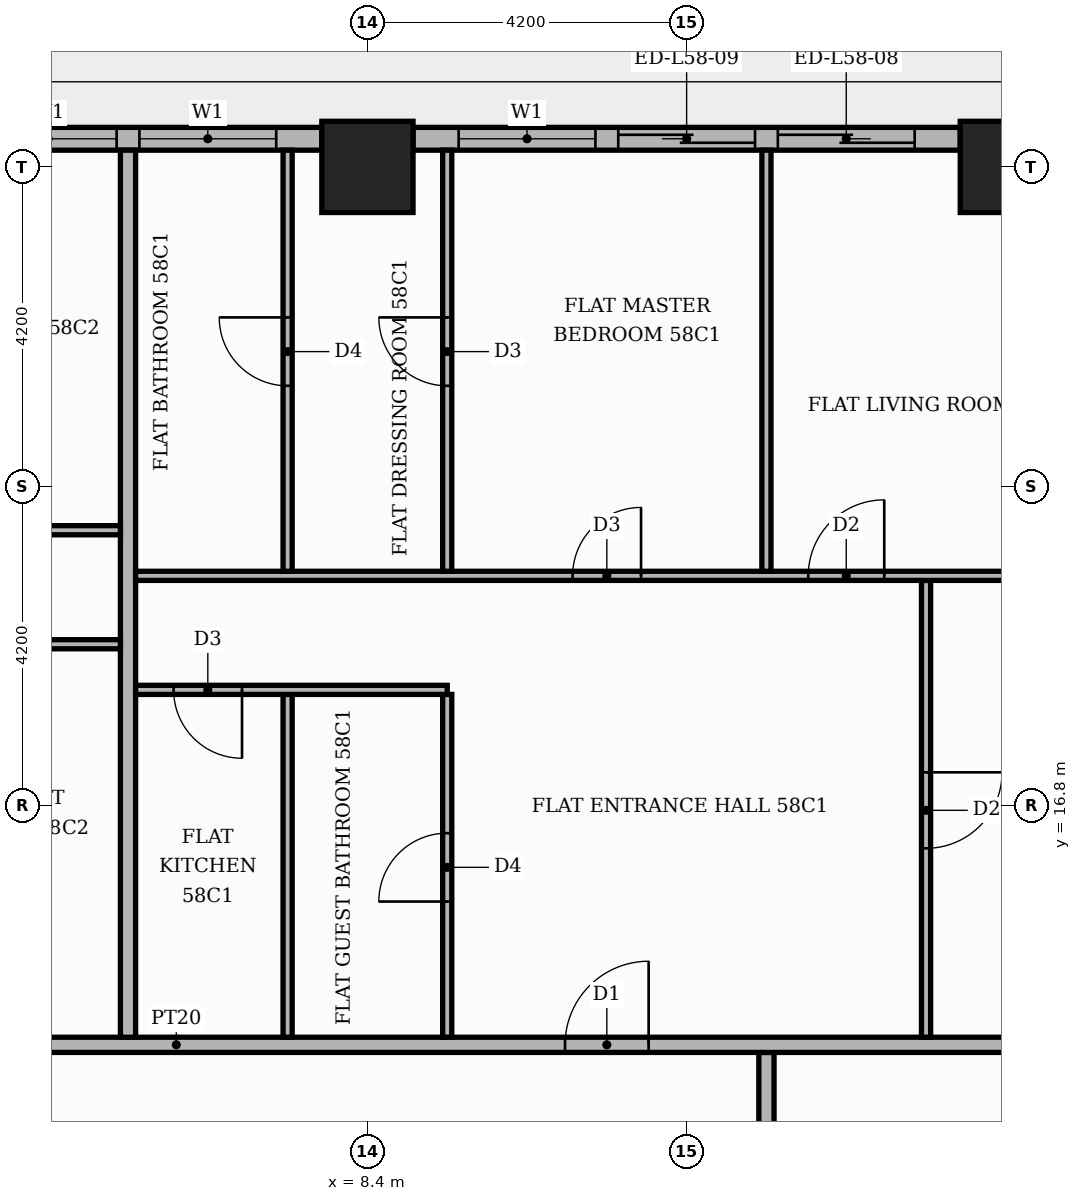
"""IFC4 building model, lengths in metres.
Left out: names, types, materials, properties, quantities, classifications, styles, units other than length and angle.
Written with IfcOpenShell. Run it as: python <this file> out.ifc"""

import sys

from ifc_helpers import new_model, si_unit, direction, frame, frame_2d, origin, origin_2d, place, context, subcontext, project, spatial, rectangle, extrude, element, fill, save


model = new_model("IFC4")
c1 = context("Model", 3, precision=1e-05, world=origin(), true_north=direction((0.0, 1.0)))
c2 = subcontext(c1, "Body", "Model", "MODEL_VIEW")
j1 = project(units=[si_unit("LENGTHUNIT", "METRE"), si_unit("PLANEANGLEUNIT", "RADIAN")], contexts=[c1])
p1 = place(None, origin())
s1 = spatial("IfcSite", under=j1, at=p1, CompositionType="ELEMENT")
p2 = place(p1, origin())
s2 = spatial("IfcBuilding", under=s1, at=p2, CompositionType="ELEMENT")
p3 = place(p2, frame((0.0, 0.0, 244.5)))
s3 = spatial("IfcBuildingStorey", under=s2, at=p3, CompositionType="ELEMENT", Elevation=244.5)
for number, where, z_axis, x_axis in (
    (1, (8.4, 25.2, 0.0), (0.0, 0.0, 1.0), (1.0, 0.0, 0.0)),
    (2, (16.8, 25.2, 0.0), (0.0, 0.0, 1.0), (1.0, 0.0, 0.0)),
):
    element("IfcColumn", number, at=place(p3, frame(where, z_axis=z_axis, x_axis=x_axis)), inside=s3, PredefinedType="COLUMN", context=c2, shape_type="SweptSolid", body=[
        extrude(rectangle(XDim=1.2, YDim=1.2, at=origin_2d()), origin(), (0.0, 0.0, 1.0), 3.9),
    ])
p4 = place(p3, frame((16.2, 25.57, 0.0), z_axis=(0.0, 0.0, 1.0), x_axis=(-1.0, 0.0, 0.0)))
e3 = element("IfcWall", 3, at=p4, inside=s3, PredefinedType="STANDARD", context=c2, shape_type="SweptSolid", body=[
    extrude(rectangle(XDim=7.2, YDim=0.3, at=frame_2d((3.6, 0.0))), origin(), (0.0, 0.0, 1.0), 3.48),
])
p5 = place(p4, frame((0.6, 0.0, 0.0)))
e4 = element("IfcOpeningElement", 4, at=p5, cuts=e3, PredefinedType="OPENING", context=c2, shape_type="SweptSolid", body=[
    extrude(rectangle(XDim=1.8, YDim=2.4, at=frame_2d((0.9, 1.2))), frame((0.0, 0.16, 0.0), z_axis=(0.0, -1.0, 0.0), x_axis=(1.0, 0.0, 0.0)), (0.0, 0.0, 1.0), 0.32),
])
p6 = place(p4, frame((2.7, 0.0, 0.0)))
e5 = element("IfcOpeningElement", 5, at=p6, cuts=e3, PredefinedType="OPENING", context=c2, shape_type="SweptSolid", body=[
    extrude(rectangle(XDim=1.8, YDim=2.4, at=frame_2d((0.9, 1.2))), frame((0.0, 0.16, 0.0), z_axis=(0.0, -1.0, 0.0), x_axis=(1.0, 0.0, 0.0)), (0.0, 0.0, 1.0), 0.32),
])
p7 = place(p4, frame((4.8, 0.0, 0.9)))
e6 = element("IfcOpeningElement", 6, at=p7, cuts=e3, PredefinedType="OPENING", context=c2, shape_type="SweptSolid", body=[
    extrude(rectangle(XDim=1.8, YDim=2.1, at=frame_2d((0.9, 1.05))), frame((0.0, 0.16, 0.0), z_axis=(0.0, -1.0, 0.0), x_axis=(1.0, 0.0, 0.0)), (0.0, 0.0, 1.0), 0.32),
])
p8 = place(p3, frame((7.8, 25.57, 0.0), z_axis=(0.0, 0.0, 1.0), x_axis=(-1.0, 0.0, 0.0)))
e7 = element("IfcWall", 7, at=p8, inside=s3, PredefinedType="STANDARD", context=c2, shape_type="SweptSolid", body=[
    extrude(rectangle(XDim=7.2, YDim=0.3, at=frame_2d((3.6, 0.0))), origin(), (0.0, 0.0, 1.0), 3.48),
])
p9 = place(p8, frame((0.6, 0.0, 0.9)))
e8 = element("IfcOpeningElement", 8, at=p9, cuts=e7, PredefinedType="OPENING", context=c2, shape_type="SweptSolid", body=[
    extrude(rectangle(XDim=1.8, YDim=2.1, at=frame_2d((0.9, 1.05))), frame((0.0, 0.16, 0.0), z_axis=(0.0, -1.0, 0.0), x_axis=(1.0, 0.0, 0.0)), (0.0, 0.0, 1.0), 0.32),
])
p10 = place(p8, frame((2.7, 0.0, 0.9)))
e9 = element("IfcOpeningElement", 9, at=p10, cuts=e7, PredefinedType="OPENING", context=c2, shape_type="SweptSolid", body=[
    extrude(rectangle(XDim=1.8, YDim=2.1, at=frame_2d((0.9, 1.05))), frame((0.0, 0.16, 0.0), z_axis=(0.0, -1.0, 0.0), x_axis=(1.0, 0.0, 0.0)), (0.0, 0.0, 1.0), 0.32),
])
p11 = place(p8, frame((4.8, 0.0, 0.0)))
e10 = element("IfcOpeningElement", 10, at=p11, cuts=e7, PredefinedType="OPENING", context=c2, shape_type="SweptSolid", body=[
    extrude(rectangle(XDim=1.8, YDim=2.4, at=frame_2d((0.9, 1.2))), frame((0.0, 0.16, 0.0), z_axis=(0.0, -1.0, 0.0), x_axis=(1.0, 0.0, 0.0)), (0.0, 0.0, 1.0), 0.32),
])
p12 = place(p3, frame((13.65, 11.1, 0.0), z_axis=(0.0, 0.0, 1.0), x_axis=(0.0, 1.0, 0.0)))
e11 = element("IfcWall", 11, at=p12, inside=s3, PredefinedType="PARTITIONING", context=c2, shape_type="SweptSolid", body=[
    extrude(rectangle(XDim=2.45, YDim=0.2, at=frame_2d((1.225, 0.0))), origin(), (0.0, 0.0, 1.0), 3.48),
])
p13 = place(p3, frame((-13.65, 13.65, 0.0), z_axis=(0.0, 0.0, 1.0), x_axis=(1.0, 0.0, 0.0)))
e12 = element("IfcWall", 12, at=p13, inside=s3, PredefinedType="PARTITIONING", context=c2, shape_type="SweptSolid", body=[
    extrude(rectangle(XDim=39.07, YDim=0.2, at=frame_2d((19.535, 0.0))), origin(), (0.0, 0.0, 1.0), 3.48),
])
p14 = place(p13, frame((24.65, 0.0, 0.0)))
e13 = element("IfcOpeningElement", 13, at=p14, cuts=e12, PredefinedType="OPENING", context=c2, shape_type="SweptSolid", body=[
    extrude(rectangle(XDim=1.1, YDim=2.4, at=frame_2d((0.55, 1.2))), frame((0.0, 0.11, 0.0), z_axis=(0.0, -1.0, 0.0), x_axis=(1.0, 0.0, 0.0)), (0.0, 0.0, 1.0), 0.22),
])
p15 = place(p13, frame((12.05, 0.0, 0.0)))
e14 = element("IfcOpeningElement", 14, at=p15, cuts=e12, PredefinedType="OPENING", context=c2, shape_type="SweptSolid", body=[
    extrude(rectangle(XDim=1.1, YDim=2.4, at=frame_2d((0.55, 1.2))), frame((0.0, 0.11, 0.0), z_axis=(0.0, -1.0, 0.0), x_axis=(1.0, 0.0, 0.0)), (0.0, 0.0, 1.0), 0.22),
])
p16 = place(p3, frame((5.25, 13.75, 0.0), z_axis=(0.0, 0.0, 1.0), x_axis=(0.0, 1.0, 0.0)))
e15 = element("IfcWall", 15, at=p16, inside=s3, PredefinedType="PARTITIONING", context=c2, shape_type="SweptSolid", body=[
    extrude(rectangle(XDim=11.67, YDim=0.2, at=frame_2d((5.835, 0.0))), origin(), (0.0, 0.0, 1.0), 3.48),
])
p17 = place(p3, frame((7.35, 13.75, 0.0), z_axis=(0.0, 0.0, 1.0), x_axis=(0.0, 1.0, 0.0)))
e16 = element("IfcWall", 16, at=p17, inside=s3, PredefinedType="PARTITIONING", context=c2, shape_type="SweptSolid", body=[
    extrude(rectangle(XDim=4.51, YDim=0.12, at=frame_2d((2.255, 0.0))), origin(), (0.0, 0.0, 1.0), 3.48),
])
p18 = place(p3, frame((9.45, 13.75, 0.0), z_axis=(0.0, 0.0, 1.0), x_axis=(0.0, 1.0, 0.0)))
e17 = element("IfcWall", 17, at=p18, inside=s3, PredefinedType="PARTITIONING", context=c2, shape_type="SweptSolid", body=[
    extrude(rectangle(XDim=4.51, YDim=0.12, at=frame_2d((2.255, 0.0))), origin(), (0.0, 0.0, 1.0), 3.48),
])
p19 = place(p18, frame((1.785, 0.0, 0.0)))
e18 = element("IfcOpeningElement", 18, at=p19, cuts=e17, PredefinedType="OPENING", context=c2, shape_type="SweptSolid", body=[
    extrude(rectangle(XDim=0.9, YDim=2.1, at=frame_2d((0.45, 1.05))), frame((0.0, 0.07, 0.0), z_axis=(0.0, -1.0, 0.0), x_axis=(1.0, 0.0, 0.0)), (0.0, 0.0, 1.0), 0.14),
])
p20 = place(p3, frame((15.75, 13.75, 0.0), z_axis=(0.0, 0.0, 1.0), x_axis=(0.0, 1.0, 0.0)))
e19 = element("IfcWall", 19, at=p20, inside=s3, PredefinedType="PARTITIONING", context=c2, shape_type="SweptSolid", body=[
    extrude(rectangle(XDim=6.01, YDim=0.12, at=frame_2d((3.005, 0.0))), origin(), (0.0, 0.0, 1.0), 3.48),
])
p21 = place(p20, frame((2.485, 0.0, 0.0)))
e20 = element("IfcOpeningElement", 20, at=p21, cuts=e19, PredefinedType="OPENING", context=c2, shape_type="SweptSolid", body=[
    extrude(rectangle(XDim=1.0, YDim=2.1, at=frame_2d((0.5, 1.05))), frame((0.0, 0.07, 0.0), z_axis=(0.0, -1.0, 0.0), x_axis=(1.0, 0.0, 0.0)), (0.0, 0.0, 1.0), 0.14),
])
p22 = place(p3, frame((5.35, 18.32, 0.0), z_axis=(0.0, 0.0, 1.0), x_axis=(1.0, 0.0, 0.0)))
e21 = element("IfcWall", 21, at=p22, inside=s3, PredefinedType="PARTITIONING", context=c2, shape_type="SweptSolid", body=[
    extrude(rectangle(XDim=4.1, YDim=0.12, at=frame_2d((2.05, 0.0))), origin(), (0.0, 0.0, 1.0), 3.48),
])
p23 = place(p22, frame((0.5, 0.0, 0.0)))
e22 = element("IfcOpeningElement", 22, at=p23, cuts=e21, PredefinedType="OPENING", context=c2, shape_type="SweptSolid", body=[
    extrude(rectangle(XDim=0.9, YDim=2.1, at=frame_2d((0.45, 1.05))), frame((0.0, 0.07, 0.0), z_axis=(0.0, -1.0, 0.0), x_axis=(1.0, 0.0, 0.0)), (0.0, 0.0, 1.0), 0.14),
])
p24 = place(p3, frame((1.05, 18.92, 0.0), z_axis=(0.0, 0.0, 1.0), x_axis=(1.0, 0.0, 0.0)))
e23 = element("IfcWall", 23, at=p24, inside=s3, PredefinedType="PARTITIONING", context=c2, shape_type="SweptSolid", body=[
    extrude(rectangle(XDim=4.1, YDim=0.12, at=frame_2d((2.05, 0.0))), origin(), (0.0, 0.0, 1.0), 3.48),
])
p25 = place(p3, frame((5.35, 19.82, 0.0), z_axis=(0.0, 0.0, 1.0), x_axis=(1.0, 0.0, 0.0)))
e24 = element("IfcWall", 24, at=p25, inside=s3, PredefinedType="PARTITIONING", context=c2, shape_type="SweptSolid", body=[
    extrude(rectangle(XDim=12.35, YDim=0.12, at=frame_2d((6.175, 0.0))), origin(), (0.0, 0.0, 1.0), 3.48),
])
p26 = place(p25, frame((8.85, 0.0, 0.0)))
e25 = element("IfcOpeningElement", 25, at=p26, cuts=e24, PredefinedType="OPENING", context=c2, shape_type="SweptSolid", body=[
    extrude(rectangle(XDim=1.0, YDim=2.1, at=frame_2d((0.5, 1.05))), frame((0.0, 0.07, 0.0), z_axis=(0.0, -1.0, 0.0), x_axis=(1.0, 0.0, 0.0)), (0.0, 0.0, 1.0), 0.14),
])
p27 = place(p25, frame((5.75, 0.0, 0.0)))
e26 = element("IfcOpeningElement", 26, at=p27, cuts=e24, PredefinedType="OPENING", context=c2, shape_type="SweptSolid", body=[
    extrude(rectangle(XDim=0.9, YDim=2.1, at=frame_2d((0.45, 1.05))), frame((0.0, 0.07, 0.0), z_axis=(0.0, -1.0, 0.0), x_axis=(1.0, 0.0, 0.0)), (0.0, 0.0, 1.0), 0.14),
])
p28 = place(p3, frame((7.35, 19.88, 0.0), z_axis=(0.0, 0.0, 1.0), x_axis=(0.0, 1.0, 0.0)))
e27 = element("IfcWall", 27, at=p28, inside=s3, PredefinedType="PARTITIONING", context=c2, shape_type="SweptSolid", body=[
    extrude(rectangle(XDim=5.54, YDim=0.12, at=frame_2d((2.77, 0.0))), origin(), (0.0, 0.0, 1.0), 3.48),
])
p29 = place(p28, frame((2.44, 0.0, 0.0)))
e28 = element("IfcOpeningElement", 28, at=p29, cuts=e27, PredefinedType="OPENING", context=c2, shape_type="SweptSolid", body=[
    extrude(rectangle(XDim=0.9, YDim=2.1, at=frame_2d((0.45, 1.05))), frame((0.0, 0.07, 0.0), z_axis=(0.0, -1.0, 0.0), x_axis=(1.0, 0.0, 0.0)), (0.0, 0.0, 1.0), 0.14),
])
p30 = place(p3, frame((9.45, 19.88, 0.0), z_axis=(0.0, 0.0, 1.0), x_axis=(0.0, 1.0, 0.0)))
e29 = element("IfcWall", 29, at=p30, inside=s3, PredefinedType="PARTITIONING", context=c2, shape_type="SweptSolid", body=[
    extrude(rectangle(XDim=5.54, YDim=0.12, at=frame_2d((2.77, 0.0))), origin(), (0.0, 0.0, 1.0), 3.48),
])
p31 = place(p30, frame((2.44, 0.0, 0.0)))
e30 = element("IfcOpeningElement", 30, at=p31, cuts=e29, PredefinedType="OPENING", context=c2, shape_type="SweptSolid", body=[
    extrude(rectangle(XDim=0.9, YDim=2.1, at=frame_2d((0.45, 1.05))), frame((0.0, 0.07, 0.0), z_axis=(0.0, -1.0, 0.0), x_axis=(1.0, 0.0, 0.0)), (0.0, 0.0, 1.0), 0.14),
])
p32 = place(p3, frame((13.65, 19.88, 0.0), z_axis=(0.0, 0.0, 1.0), x_axis=(0.0, 1.0, 0.0)))
e31 = element("IfcWall", 31, at=p32, inside=s3, PredefinedType="PARTITIONING", context=c2, shape_type="SweptSolid", body=[
    extrude(rectangle(XDim=5.54, YDim=0.12, at=frame_2d((2.77, 0.0))), origin(), (0.0, 0.0, 1.0), 3.48),
])
p33 = place(p3, frame((-13.55, 20.42, 0.0), z_axis=(0.0, 0.0, 1.0), x_axis=(1.0, 0.0, 0.0)))
e32 = element("IfcWall", 32, at=p33, inside=s3, PredefinedType="PARTITIONING", context=c2, shape_type="SweptSolid", body=[
    extrude(rectangle(XDim=18.7, YDim=0.12, at=frame_2d((9.35, 0.0))), origin(), (0.0, 0.0, 1.0), 3.48),
])
p34 = place(p33, frame((16.2, 0.0, 0.0)))
e33 = element("IfcOpeningElement", 33, at=p34, cuts=e32, PredefinedType="OPENING", context=c2, shape_type="SweptSolid", body=[
    extrude(rectangle(XDim=1.0, YDim=2.1, at=frame_2d((0.5, 1.05))), frame((0.0, 0.07, 0.0), z_axis=(0.0, -1.0, 0.0), x_axis=(1.0, 0.0, 0.0)), (0.0, 0.0, 1.0), 0.14),
])
p35 = place(p33, frame((12.05, 0.0, 0.0)))
e34 = element("IfcOpeningElement", 34, at=p35, cuts=e32, PredefinedType="OPENING", context=c2, shape_type="SweptSolid", body=[
    extrude(rectangle(XDim=0.9, YDim=2.1, at=frame_2d((0.45, 1.05))), frame((0.0, 0.07, 0.0), z_axis=(0.0, -1.0, 0.0), x_axis=(1.0, 0.0, 0.0)), (0.0, 0.0, 1.0), 0.14),
])
p36 = place(p33, frame((3.65, 0.0, 0.0)))
e35 = element("IfcOpeningElement", 35, at=p36, cuts=e32, PredefinedType="OPENING", context=c2, shape_type="SweptSolid", body=[
    extrude(rectangle(XDim=0.9, YDim=2.1, at=frame_2d((0.45, 1.05))), frame((0.0, 0.07, 0.0), z_axis=(0.0, -1.0, 0.0), x_axis=(1.0, 0.0, 0.0)), (0.0, 0.0, 1.0), 0.14),
])
p37 = place(p5, origin())
e36 = element("IfcDoor", 36, at=p37, inside=s3, OperationType="SLIDING_TO_LEFT", PredefinedType="DOOR", context=c2, shape_type="SweptSolid", body=[
    extrude(rectangle(XDim=1.8, YDim=2.4, at=frame_2d((0.9, 1.2))), frame((0.0, 0.025, 0.0), z_axis=(0.0, -1.0, 0.0), x_axis=(1.0, 0.0, 0.0)), (0.0, 0.0, 1.0), 0.05),
])
fill(e4, e36)
p38 = place(p6, origin())
e37 = element("IfcDoor", 37, at=p38, inside=s3, OperationType="SLIDING_TO_RIGHT", PredefinedType="DOOR", context=c2, shape_type="SweptSolid", body=[
    extrude(rectangle(XDim=1.8, YDim=2.4, at=frame_2d((0.9, 1.2))), frame((0.0, 0.025, 0.0), z_axis=(0.0, -1.0, 0.0), x_axis=(1.0, 0.0, 0.0)), (0.0, 0.0, 1.0), 0.05),
])
fill(e5, e37)
p39 = place(p7, origin())
e38 = element("IfcWindow", 38, at=p39, inside=s3, PartitioningType="SINGLE_PANEL", PredefinedType="WINDOW", context=c2, shape_type="SweptSolid", body=[
    extrude(rectangle(XDim=1.8, YDim=2.1, at=frame_2d((0.9, 1.05))), frame((0.0, 0.03, 0.0), z_axis=(0.0, -1.0, 0.0), x_axis=(1.0, 0.0, 0.0)), (0.0, 0.0, 1.0), 0.06),
])
fill(e6, e38)
p40 = place(p9, origin())
e39 = element("IfcWindow", 39, at=p40, inside=s3, PartitioningType="SINGLE_PANEL", PredefinedType="WINDOW", context=c2, shape_type="SweptSolid", body=[
    extrude(rectangle(XDim=1.8, YDim=2.1, at=frame_2d((0.9, 1.05))), frame((0.0, 0.03, 0.0), z_axis=(0.0, -1.0, 0.0), x_axis=(1.0, 0.0, 0.0)), (0.0, 0.0, 1.0), 0.06),
])
fill(e8, e39)
p41 = place(p10, origin())
e40 = element("IfcWindow", 40, at=p41, inside=s3, PartitioningType="SINGLE_PANEL", PredefinedType="WINDOW", context=c2, shape_type="SweptSolid", body=[
    extrude(rectangle(XDim=1.8, YDim=2.1, at=frame_2d((0.9, 1.05))), frame((0.0, 0.03, 0.0), z_axis=(0.0, -1.0, 0.0), x_axis=(1.0, 0.0, 0.0)), (0.0, 0.0, 1.0), 0.06),
])
fill(e9, e40)
p42 = place(p14, origin())
e41 = element("IfcDoor", 41, at=p42, inside=s3, OperationType="SINGLE_SWING_RIGHT", PredefinedType="DOOR", context=c2, shape_type="SweptSolid", body=[
    extrude(rectangle(XDim=1.1, YDim=2.4, at=frame_2d((0.55, 1.2))), frame((0.0, 0.025, 0.0), z_axis=(0.0, -1.0, 0.0), x_axis=(1.0, 0.0, 0.0)), (0.0, 0.0, 1.0), 0.05),
])
fill(e13, e41)
p43 = place(p21, frame((1.0, 0.0, 0.0), z_axis=(0.0, 0.0, 1.0), x_axis=(-1.0, 0.0, 0.0)))
e42 = element("IfcDoor", 42, at=p43, inside=s3, OperationType="SINGLE_SWING_RIGHT", PredefinedType="DOOR", context=c2, shape_type="SweptSolid", body=[
    extrude(rectangle(XDim=1.0, YDim=2.1, at=frame_2d((0.5, 1.05))), frame((0.0, 0.025, 0.0), z_axis=(0.0, -1.0, 0.0), x_axis=(1.0, 0.0, 0.0)), (0.0, 0.0, 1.0), 0.05),
])
fill(e20, e42)
p44 = place(p19, origin())
e43 = element("IfcDoor", 43, at=p44, inside=s3, OperationType="SINGLE_SWING_LEFT", PredefinedType="DOOR", context=c2, shape_type="SweptSolid", body=[
    extrude(rectangle(XDim=0.9, YDim=2.1, at=frame_2d((0.45, 1.05))), frame((0.0, 0.025, 0.0), z_axis=(0.0, -1.0, 0.0), x_axis=(1.0, 0.0, 0.0)), (0.0, 0.0, 1.0), 0.05),
])
fill(e18, e43)
p45 = place(p23, frame((0.9, 0.0, 0.0), z_axis=(0.0, 0.0, 1.0), x_axis=(-1.0, 0.0, 0.0)))
e44 = element("IfcDoor", 44, at=p45, inside=s3, OperationType="SINGLE_SWING_RIGHT", PredefinedType="DOOR", context=c2, shape_type="SweptSolid", body=[
    extrude(rectangle(XDim=0.9, YDim=2.1, at=frame_2d((0.45, 1.05))), frame((0.0, 0.025, 0.0), z_axis=(0.0, -1.0, 0.0), x_axis=(1.0, 0.0, 0.0)), (0.0, 0.0, 1.0), 0.05),
])
fill(e22, e44)
p46 = place(p26, origin())
e45 = element("IfcDoor", 45, at=p46, inside=s3, OperationType="SINGLE_SWING_RIGHT", PredefinedType="DOOR", context=c2, shape_type="SweptSolid", body=[
    extrude(rectangle(XDim=1.0, YDim=2.1, at=frame_2d((0.5, 1.05))), frame((0.0, 0.025, 0.0), z_axis=(0.0, -1.0, 0.0), x_axis=(1.0, 0.0, 0.0)), (0.0, 0.0, 1.0), 0.05),
])
fill(e25, e45)
p47 = place(p27, origin())
e46 = element("IfcDoor", 46, at=p47, inside=s3, OperationType="SINGLE_SWING_RIGHT", PredefinedType="DOOR", context=c2, shape_type="SweptSolid", body=[
    extrude(rectangle(XDim=0.9, YDim=2.1, at=frame_2d((0.45, 1.05))), frame((0.0, 0.025, 0.0), z_axis=(0.0, -1.0, 0.0), x_axis=(1.0, 0.0, 0.0)), (0.0, 0.0, 1.0), 0.05),
])
fill(e26, e46)
p48 = place(p31, origin())
e47 = element("IfcDoor", 47, at=p48, inside=s3, OperationType="SINGLE_SWING_RIGHT", PredefinedType="DOOR", context=c2, shape_type="SweptSolid", body=[
    extrude(rectangle(XDim=0.9, YDim=2.1, at=frame_2d((0.45, 1.05))), frame((0.0, 0.025, 0.0), z_axis=(0.0, -1.0, 0.0), x_axis=(1.0, 0.0, 0.0)), (0.0, 0.0, 1.0), 0.05),
])
fill(e30, e47)
p49 = place(p29, origin())
e48 = element("IfcDoor", 48, at=p49, inside=s3, OperationType="SINGLE_SWING_RIGHT", PredefinedType="DOOR", context=c2, shape_type="SweptSolid", body=[
    extrude(rectangle(XDim=0.9, YDim=2.1, at=frame_2d((0.45, 1.05))), frame((0.0, 0.025, 0.0), z_axis=(0.0, -1.0, 0.0), x_axis=(1.0, 0.0, 0.0)), (0.0, 0.0, 1.0), 0.05),
])
fill(e28, e48)
save(model, sys.argv[1])
